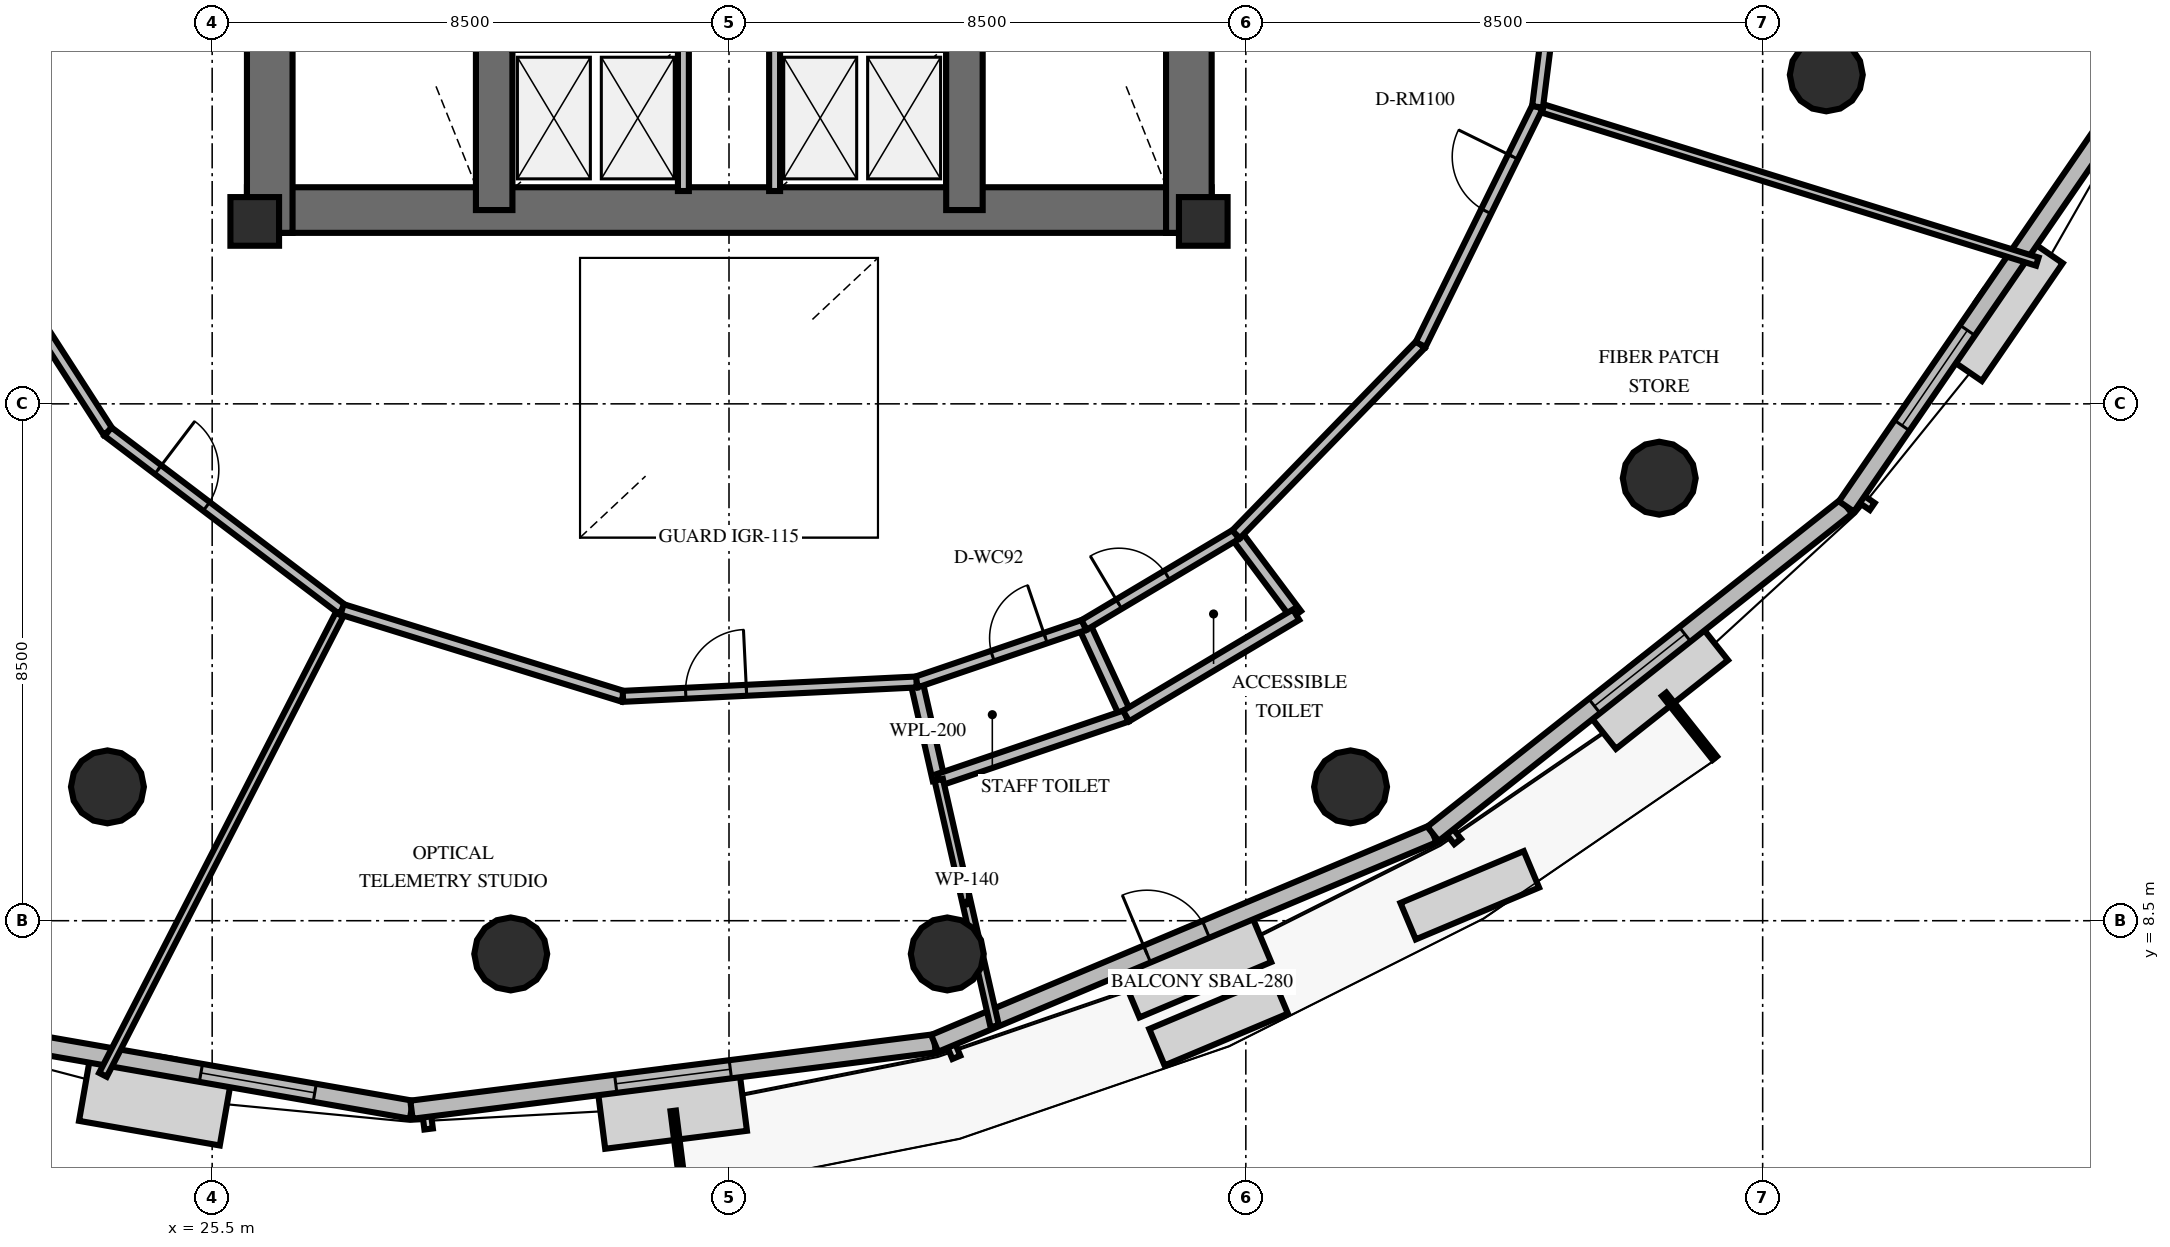
"""IFC4 building model, lengths in metres.
Left out: names, types, materials, properties, quantities, classifications, styles, units other than length and angle.
Written with IfcOpenShell. Run it as: python <this file> out.ifc"""

import sys

from ifc_helpers import new_model, si_unit, direction, frame, frame_2d, origin, origin_2d, place, context, subcontext, project, spatial, rectangle, circle, extrude, element, fill, save


model = new_model("IFC4")
c1 = context("Model", 3, precision=1e-05, world=origin(), true_north=direction((0.0, 1.0)))
c2 = subcontext(c1, "Body", "Model", "MODEL_VIEW")
j1 = project(units=[si_unit("LENGTHUNIT", "METRE"), si_unit("PLANEANGLEUNIT", "RADIAN")], contexts=[c1])
p1 = place(None, origin())
s1 = spatial("IfcSite", under=j1, at=p1, CompositionType="ELEMENT")
p2 = place(p1, origin())
s2 = spatial("IfcBuilding", under=s1, at=p2, CompositionType="ELEMENT")
p3 = place(p2, frame((0.0, 0.0, 129.8)))
s3 = spatial("IfcBuildingStorey", under=s2, at=p3, CompositionType="ELEMENT", Elevation=129.8)
p4 = place(p3, frame((26.072, 20.187, 0.0), z_axis=(0.0, 0.0, 1.0), x_axis=(1.0, 0.0, 0.0)))
e1 = element("IfcWall", 1, at=p4, inside=s3, PredefinedType="SHEAR", context=c2, shape_type="SweptSolid", body=[
    extrude(rectangle(XDim=15.866, YDim=0.75, at=frame_2d((7.933, 0.0))), origin(), (0.0, 0.0, 1.0), 4.0),
])
for number, where, z_axis, x_axis in (
    (2, (26.447, 19.812, 0.0), (0.0, 0.0, 1.0), (0.0, 1.0, 0.0)),
    (3, (41.563, 19.812, 0.0), (0.0, 0.0, 1.0), (0.0, 1.0, 0.0)),
):
    element("IfcWall", number, at=place(p3, frame(where, z_axis=z_axis, x_axis=x_axis)), inside=s3, PredefinedType="SHEAR", context=c2, shape_type="SweptSolid", body=[
        extrude(rectangle(XDim=10.576, YDim=0.75, at=frame_2d((5.288, 0.0))), origin(), (0.0, 0.0, 1.0), 4.0),
    ])
for number, where, z_axis, x_axis in (
    (4, (30.138, 20.187, 0.0), (0.0, 0.0, 1.0), (0.0, 1.0, 0.0)),
    (5, (37.872, 20.187, 0.0), (0.0, 0.0, 1.0), (0.0, 1.0, 0.0)),
):
    element("IfcWall", number, at=place(p3, frame(where, z_axis=z_axis, x_axis=x_axis)), inside=s3, PredefinedType="SHEAR", context=c2, shape_type="SweptSolid", body=[
        extrude(rectangle(XDim=9.826, YDim=0.6, at=frame_2d((4.913, 0.0))), origin(), (0.0, 0.0, 1.0), 4.0),
    ])
for number, where, z_axis, x_axis in (
    (6, (26.2, 20.0, 0.0), (0.0, 0.0, 1.0), (1.0, 0.0, 0.0)),
    (7, (41.8, 20.0, 0.0), (0.0, 0.0, 1.0), (1.0, 0.0, 0.0)),
):
    element("IfcColumn", number, at=place(p3, frame(where, z_axis=z_axis, x_axis=x_axis)), inside=s3, PredefinedType="PILASTER", context=c2, shape_type="SweptSolid", body=[
        extrude(rectangle(XDim=0.8, YDim=0.8, at=origin_2d()), origin(), (0.0, 0.0, 1.0), 4.0),
    ])
for number, where, z_axis, x_axis in (
    (8, (23.778, 10.701, 0.0), (0.0, 0.0, 1.0), (1.0, 0.0, 0.0)),
    (9, (30.41, 7.954, 0.0), (0.0, 0.0, 1.0), (1.0, 0.0, 0.0)),
    (10, (37.59, 7.954, 0.0), (0.0, 0.0, 1.0), (1.0, 0.0, 0.0)),
    (11, (44.222, 10.701, 0.0), (0.0, 0.0, 1.0), (1.0, 0.0, 0.0)),
    (12, (49.299, 15.778, 0.0), (0.0, 0.0, 1.0), (1.0, 0.0, 0.0)),
    (13, (52.046, 22.41, 0.0), (0.0, 0.0, 1.0), (1.0, 0.0, 0.0)),
):
    element("IfcColumn", number, at=place(p3, frame(where, z_axis=z_axis, x_axis=x_axis)), inside=s3, PredefinedType="COLUMN", context=c2, shape_type="SweptSolid", body=[
        extrude(circle(Radius=0.6, at=origin_2d()), origin(), (0.0, 0.0, 1.0), 4.0),
    ])
p5 = place(p3, frame((20.804, 6.786, 0.0), z_axis=(0.0, 0.0, 1.0), x_axis=(0.985055293806, -0.172238404964, 0.0)))
e14 = element("IfcWall", 14, at=p5, inside=s3, PredefinedType="SOLIDWALL", context=c2, shape_type="SweptSolid", body=[
    extrude(rectangle(XDim=8.095, YDim=0.3, at=frame_2d((4.048, 0.0))), origin(), (0.0, 0.0, 1.0), 2.9),
])
p6 = place(p5, frame((4.58, 0.0, 0.8)))
e15 = element("IfcOpeningElement", 15, at=p6, cuts=e14, PredefinedType="OPENING", context=c2, shape_type="SweptSolid", body=[
    extrude(rectangle(XDim=1.9, YDim=1.95, at=frame_2d((0.95, 0.975))), frame((0.0, 0.16, 0.0), z_axis=(0.0, -1.0, 0.0), x_axis=(1.0, 0.0, 0.0)), (0.0, 0.0, 1.0), 0.32),
])
p7 = place(p3, frame((28.778, 5.392, 0.0), z_axis=(0.0, 0.0, 1.0), x_axis=(0.992051922293, 0.12582918372, 0.0)))
e16 = element("IfcWall", 16, at=p7, inside=s3, PredefinedType="SOLIDWALL", context=c2, shape_type="SweptSolid", body=[
    extrude(rectangle(XDim=8.673, YDim=0.3, at=frame_2d((4.336, 0.0))), origin(), (0.0, 0.0, 1.0), 2.9),
])
p8 = place(p7, frame((3.386, 0.0, 0.8)))
e17 = element("IfcOpeningElement", 17, at=p8, cuts=e16, PredefinedType="OPENING", context=c2, shape_type="SweptSolid", body=[
    extrude(rectangle(XDim=1.9, YDim=1.95, at=frame_2d((0.95, 0.975))), frame((0.0, 0.16, 0.0), z_axis=(0.0, -1.0, 0.0), x_axis=(1.0, 0.0, 0.0)), (0.0, 0.0, 1.0), 0.32),
])
p9 = place(p3, frame((37.382, 6.483, 0.0), z_axis=(0.0, 0.0, 1.0), x_axis=(0.921862650999, 0.387516777305, 0.0)))
e18 = element("IfcWall", 18, at=p9, inside=s3, PredefinedType="SOLIDWALL", context=c2, shape_type="SweptSolid", body=[
    extrude(rectangle(XDim=8.891, YDim=0.3, at=frame_2d((4.445, 0.0))), origin(), (0.0, 0.0, 1.0), 2.9),
])
p10 = place(p9, frame((3.79, 0.0, 0.0)))
e19 = element("IfcOpeningElement", 19, at=p10, cuts=e18, PredefinedType="OPENING", context=c2, shape_type="SweptSolid", body=[
    extrude(rectangle(XDim=1.05, YDim=2.15, at=frame_2d((0.525, 1.075))), frame((0.0, 0.16, 0.0), z_axis=(0.0, -1.0, 0.0), x_axis=(1.0, 0.0, 0.0)), (0.0, 0.0, 1.0), 0.32),
])
p11 = place(p3, frame((45.578, 9.929, 0.0), z_axis=(0.0, 0.0, 1.0), x_axis=(0.784011575573, 0.620746203667, 0.0)))
e20 = element("IfcWall", 20, at=p11, inside=s3, PredefinedType="SOLIDWALL", context=c2, shape_type="SweptSolid", body=[
    extrude(rectangle(XDim=8.673, YDim=0.3, at=frame_2d((4.336, 0.0))), origin(), (0.0, 0.0, 1.0), 2.9),
])
p12 = place(p11, frame((3.386, 0.0, 0.8)))
e21 = element("IfcOpeningElement", 21, at=p12, cuts=e20, PredefinedType="OPENING", context=c2, shape_type="SweptSolid", body=[
    extrude(rectangle(XDim=1.9, YDim=1.95, at=frame_2d((0.95, 0.975))), frame((0.0, 0.16, 0.0), z_axis=(0.0, -1.0, 0.0), x_axis=(1.0, 0.0, 0.0)), (0.0, 0.0, 1.0), 0.32),
])
p13 = place(p3, frame((52.378, 15.312, 0.0), z_axis=(0.0, 0.0, 1.0), x_axis=(0.566158848857, 0.824296159072, 0.0)))
e22 = element("IfcWall", 22, at=p13, inside=s3, PredefinedType="SOLIDWALL", context=c2, shape_type="SweptSolid", body=[
    extrude(rectangle(XDim=8.095, YDim=0.3, at=frame_2d((4.047, 0.0))), origin(), (0.0, 0.0, 1.0), 2.9),
])
p14 = place(p13, frame((1.615, 0.0, 0.8)))
e23 = element("IfcOpeningElement", 23, at=p14, cuts=e22, PredefinedType="OPENING", context=c2, shape_type="SweptSolid", body=[
    extrude(rectangle(XDim=1.9, YDim=1.95, at=frame_2d((0.95, 0.975))), frame((0.0, 0.16, 0.0), z_axis=(0.0, -1.0, 0.0), x_axis=(1.0, 0.0, 0.0)), (0.0, 0.0, 1.0), 0.32),
])
for number, where, z_axis, x_axis in (
    (24, (33.25, 20.5, 0.0), (0.0, 0.0, 1.0), (0.0, 1.0, 0.0)),
    (25, (34.75, 20.5, 0.0), (0.0, 0.0, 1.0), (0.0, 1.0, 0.0)),
):
    element("IfcWall", number, at=place(p3, frame(where, z_axis=z_axis, x_axis=x_axis)), inside=s3, PredefinedType="SOLIDWALL", context=c2, shape_type="SweptSolid", body=[
        extrude(rectangle(XDim=2.42, YDim=0.18, at=frame_2d((1.21, 0.0))), origin(), (0.0, 0.0, 1.0), 2.8),
    ])
for number, where, z_axis, x_axis in (
    (26, (37.084, 12.426, 0.0), (0.0, 0.0, 1.0), (0.222, -0.975, 0.0)),
    (27, (39.839, 13.364, 0.0), (0.0, 0.0, 1.0), (0.419, -0.908, 0.0)),
):
    element("IfcWall", number, at=place(p3, frame(where, z_axis=z_axis, x_axis=x_axis)), inside=s3, PredefinedType="PLUMBINGWALL", context=c2, shape_type="SweptSolid", body=[
        extrude(rectangle(XDim=1.65, YDim=0.2, at=frame_2d((0.825, 0.0))), origin(), (0.0, 0.0, 1.0), 2.8),
    ])
p15 = place(p3, frame((37.449, 10.817, 0.0), z_axis=(0.0, 0.0, 1.0), x_axis=(0.946646498302, 0.322273807891, 0.0)))
e28 = element("IfcWall", 28, at=p15, inside=s3, PredefinedType="PLUMBINGWALL", context=c2, shape_type="SweptSolid", body=[
    extrude(rectangle(XDim=3.255, YDim=0.2, at=frame_2d((1.627, 0.0))), origin(), (0.0, 0.0, 1.0), 2.8),
])
p16 = place(p3, frame((37.084, 12.426, 0.0), z_axis=(0.0, 0.0, 1.0), x_axis=(0.946633568931, 0.322311784104, 0.0)))
e29 = element("IfcWall", 29, at=p16, inside=s3, PredefinedType="PARTITIONING", context=c2, shape_type="SweptSolid", body=[
    extrude(rectangle(XDim=2.91, YDim=0.18, at=frame_2d((1.455, 0.0))), origin(), (0.0, 0.0, 1.0), 2.8),
])
p17 = place(p16, frame((1.321, 0.0, 0.0)))
e30 = element("IfcOpeningElement", 30, at=p17, cuts=e29, PredefinedType="OPENING", context=c2, shape_type="SweptSolid", body=[
    extrude(rectangle(XDim=0.92, YDim=2.1, at=frame_2d((0.46, 1.05))), frame((0.0, 0.1, 0.0), z_axis=(0.0, -1.0, 0.0), x_axis=(1.0, 0.0, 0.0)), (0.0, 0.0, 1.0), 0.2),
])
p18 = place(p3, frame((42.338, 14.854, 0.0), z_axis=(0.0, 0.0, 1.0), x_axis=(0.599123667948, -0.800656499695, 0.0)))
e31 = element("IfcWall", 31, at=p18, inside=s3, PredefinedType="PLUMBINGWALL", context=c2, shape_type="SweptSolid", body=[
    extrude(rectangle(XDim=1.65, YDim=0.2, at=frame_2d((0.825, 0.0))), origin(), (0.0, 0.0, 1.0), 2.8),
])
p19 = place(p3, frame((40.531, 11.866, 0.0), z_axis=(0.0, 0.0, 1.0), x_axis=(0.858952049508, 0.512056028815, 0.0)))
e32 = element("IfcWall", 32, at=p19, inside=s3, PredefinedType="PLUMBINGWALL", context=c2, shape_type="SweptSolid", body=[
    extrude(rectangle(XDim=3.255, YDim=0.2, at=frame_2d((1.627, 0.0))), origin(), (0.0, 0.0, 1.0), 2.8),
])
p20 = place(p3, frame((39.839, 13.364, 0.0), z_axis=(0.0, 0.0, 1.0), x_axis=(0.858962586204, 0.512038353546, 0.0)))
e33 = element("IfcWall", 33, at=p20, inside=s3, PredefinedType="PARTITIONING", context=c2, shape_type="SweptSolid", body=[
    extrude(rectangle(XDim=2.91, YDim=0.18, at=frame_2d((1.455, 0.0))), origin(), (0.0, 0.0, 1.0), 2.8),
])
p21 = place(p20, frame((0.669, 0.0, 0.0)))
e34 = element("IfcOpeningElement", 34, at=p21, cuts=e33, PredefinedType="OPENING", context=c2, shape_type="SweptSolid", body=[
    extrude(rectangle(XDim=0.92, YDim=2.1, at=frame_2d((0.46, 1.05))), frame((0.0, 0.1, 0.0), z_axis=(0.0, -1.0, 0.0), x_axis=(1.0, 0.0, 0.0)), (0.0, 0.0, 1.0), 0.2),
])
p22 = place(p3, frame((37.449, 10.817, 0.0), z_axis=(0.0, 0.0, 1.0), x_axis=(0.221539804698, -0.975151329248, 0.0)))
e35 = element("IfcWall", 35, at=p22, inside=s3, PredefinedType="PARTITIONING", context=c2, shape_type="SweptSolid", body=[
    extrude(rectangle(XDim=4.154, YDim=0.14, at=frame_2d((2.077, 0.0))), origin(), (0.0, 0.0, 1.0), 2.8),
])
p23 = place(p3, frame((47.298, 21.884, 0.0), z_axis=(0.0, 0.0, 1.0), x_axis=(0.955272723626, -0.295726264467, 0.0)))
e36 = element("IfcWall", 36, at=p23, inside=s3, PredefinedType="PARTITIONING", context=c2, shape_type="SweptSolid", body=[
    extrude(rectangle(XDim=8.605, YDim=0.14, at=frame_2d((4.302, 0.0))), origin(), (0.0, 0.0, 1.0), 2.8),
])
p24 = place(p3, frame((42.338, 14.854, 0.0), z_axis=(0.0, 0.0, 1.0), x_axis=(0.697172044259, 0.716903857364, 0.0)))
e37 = element("IfcWall", 37, at=p24, inside=s3, PredefinedType="PARTITIONING", context=c2, shape_type="SweptSolid", body=[
    extrude(rectangle(XDim=4.355, YDim=0.18, at=frame_2d((2.178, 0.0))), origin(), (0.0, 0.0, 1.0), 2.8),
])
p25 = place(p3, frame((45.375, 17.976, 0.0), z_axis=(0.0, 0.0, 1.0), x_axis=(0.441509083926, 0.897256779752, 0.0)))
e38 = element("IfcWall", 38, at=p25, inside=s3, PredefinedType="PARTITIONING", context=c2, shape_type="SweptSolid", body=[
    extrude(rectangle(XDim=4.355, YDim=0.18, at=frame_2d((2.178, 0.0))), origin(), (0.0, 0.0, 1.0), 2.8),
])
p26 = place(p25, frame((2.441, 0.0, 0.0)))
e39 = element("IfcOpeningElement", 39, at=p26, cuts=e38, PredefinedType="OPENING", context=c2, shape_type="SweptSolid", body=[
    extrude(rectangle(XDim=1.0, YDim=2.15, at=frame_2d((0.5, 1.075))), frame((0.0, 0.1, 0.0), z_axis=(0.0, -1.0, 0.0), x_axis=(1.0, 0.0, 0.0)), (0.0, 0.0, 1.0), 0.2),
])
p27 = place(p3, frame((47.298, 21.884, 0.0), z_axis=(0.0, 0.0, 1.0), x_axis=(0.125296416972, 0.992119351638, 0.0)))
e40 = element("IfcWall", 40, at=p27, inside=s3, PredefinedType="PARTITIONING", context=c2, shape_type="SweptSolid", body=[
    extrude(rectangle(XDim=4.834, YDim=0.18, at=frame_2d((2.417, 0.0))), origin(), (0.0, 0.0, 1.0), 2.8),
])
p28 = place(p27, frame((2.688, 0.0, 0.0)))
e41 = element("IfcOpeningElement", 41, at=p28, cuts=e40, PredefinedType="OPENING", context=c2, shape_type="SweptSolid", body=[
    extrude(rectangle(XDim=1.15, YDim=2.15, at=frame_2d((0.575, 1.075))), frame((0.0, 0.1, 0.0), z_axis=(0.0, -1.0, 0.0), x_axis=(1.0, 0.0, 0.0)), (0.0, 0.0, 1.0), 0.2),
])
p29 = place(p3, frame((27.637, 13.619, 0.0), z_axis=(0.0, 0.0, 1.0), x_axis=(-0.457105027407, -0.889412724172, 0.0)))
e42 = element("IfcWall", 42, at=p29, inside=s3, PredefinedType="PARTITIONING", context=c2, shape_type="SweptSolid", body=[
    extrude(rectangle(XDim=8.605, YDim=0.14, at=frame_2d((4.302, 0.0))), origin(), (0.0, 0.0, 1.0), 2.8),
])
p30 = place(p3, frame((21.168, 20.606, 0.0), z_axis=(0.0, 0.0, 1.0), x_axis=(0.541732258193, -0.840551105188, 0.0)))
e43 = element("IfcWall", 43, at=p30, inside=s3, PredefinedType="PARTITIONING", context=c2, shape_type="SweptSolid", body=[
    extrude(rectangle(XDim=4.834, YDim=0.18, at=frame_2d((2.417, 0.0))), origin(), (0.0, 0.0, 1.0), 2.8),
])
p31 = place(p3, frame((23.787, 16.542, 0.0), z_axis=(0.0, 0.0, 1.0), x_axis=(0.796520179577, -0.604611944579, 0.0)))
e44 = element("IfcWall", 44, at=p31, inside=s3, PredefinedType="PARTITIONING", context=c2, shape_type="SweptSolid", body=[
    extrude(rectangle(XDim=4.834, YDim=0.18, at=frame_2d((2.417, 0.0))), origin(), (0.0, 0.0, 1.0), 2.8),
])
p32 = place(p31, frame((1.034, 0.0, 0.0)))
e45 = element("IfcOpeningElement", 45, at=p32, cuts=e44, PredefinedType="OPENING", context=c2, shape_type="SweptSolid", body=[
    extrude(rectangle(XDim=1.0, YDim=2.15, at=frame_2d((0.5, 1.075))), frame((0.0, 0.1, 0.0), z_axis=(0.0, -1.0, 0.0), x_axis=(1.0, 0.0, 0.0)), (0.0, 0.0, 1.0), 0.2),
])
p33 = place(p3, frame((27.637, 13.619, 0.0), z_axis=(0.0, 0.0, 1.0), x_axis=(0.955270945658, -0.295732007706, 0.0)))
e46 = element("IfcWall", 46, at=p33, inside=s3, PredefinedType="PARTITIONING", context=c2, shape_type="SweptSolid", body=[
    extrude(rectangle(XDim=4.834, YDim=0.18, at=frame_2d((2.417, 0.0))), origin(), (0.0, 0.0, 1.0), 2.8),
])
p34 = place(p3, frame((32.255, 12.19, 0.0), z_axis=(0.0, 0.0, 1.0), x_axis=(0.998806890168, 0.048834374699, 0.0)))
e47 = element("IfcWall", 47, at=p34, inside=s3, PredefinedType="PARTITIONING", context=c2, shape_type="SweptSolid", body=[
    extrude(rectangle(XDim=4.834, YDim=0.18, at=frame_2d((2.417, 0.0))), origin(), (0.0, 0.0, 1.0), 2.8),
])
p35 = place(p34, frame((1.034, 0.0, 0.0)))
e48 = element("IfcOpeningElement", 48, at=p35, cuts=e47, PredefinedType="OPENING", context=c2, shape_type="SweptSolid", body=[
    extrude(rectangle(XDim=1.0, YDim=2.15, at=frame_2d((0.5, 1.075))), frame((0.0, 0.1, 0.0), z_axis=(0.0, -1.0, 0.0), x_axis=(1.0, 0.0, 0.0)), (0.0, 0.0, 1.0), 0.2),
])
p36 = place(p6, origin())
e49 = element("IfcWindow", 49, at=p36, inside=s3, PartitioningType="SINGLE_PANEL", PredefinedType="WINDOW", context=c2, shape_type="SweptSolid", body=[
    extrude(rectangle(XDim=1.9, YDim=1.95, at=frame_2d((0.95, 0.975))), frame((0.0, 0.03, 0.0), z_axis=(0.0, -1.0, 0.0), x_axis=(1.0, 0.0, 0.0)), (0.0, 0.0, 1.0), 0.06),
])
fill(e15, e49)
p37 = place(p8, origin())
e50 = element("IfcWindow", 50, at=p37, inside=s3, PartitioningType="SINGLE_PANEL", PredefinedType="WINDOW", context=c2, shape_type="SweptSolid", body=[
    extrude(rectangle(XDim=1.9, YDim=1.95, at=frame_2d((0.95, 0.975))), frame((0.0, 0.03, 0.0), z_axis=(0.0, -1.0, 0.0), x_axis=(1.0, 0.0, 0.0)), (0.0, 0.0, 1.0), 0.06),
])
fill(e17, e50)
p38 = place(p10, origin())
e51 = element("IfcDoor", 51, at=p38, inside=s3, OperationType="SINGLE_SWING_LEFT", PredefinedType="DOOR", context=c2, shape_type="SweptSolid", body=[
    extrude(rectangle(XDim=1.05, YDim=2.15, at=frame_2d((0.525, 1.075))), frame((0.0, 0.025, 0.0), z_axis=(0.0, -1.0, 0.0), x_axis=(1.0, 0.0, 0.0)), (0.0, 0.0, 1.0), 0.05),
])
fill(e19, e51)
p39 = place(p12, origin())
e52 = element("IfcWindow", 52, at=p39, inside=s3, PartitioningType="SINGLE_PANEL", PredefinedType="WINDOW", context=c2, shape_type="SweptSolid", body=[
    extrude(rectangle(XDim=1.9, YDim=1.95, at=frame_2d((0.95, 0.975))), frame((0.0, 0.03, 0.0), z_axis=(0.0, -1.0, 0.0), x_axis=(1.0, 0.0, 0.0)), (0.0, 0.0, 1.0), 0.06),
])
fill(e21, e52)
p40 = place(p14, origin())
e53 = element("IfcWindow", 53, at=p40, inside=s3, PartitioningType="SINGLE_PANEL", PredefinedType="WINDOW", context=c2, shape_type="SweptSolid", body=[
    extrude(rectangle(XDim=1.9, YDim=1.95, at=frame_2d((0.95, 0.975))), frame((0.0, 0.03, 0.0), z_axis=(0.0, -1.0, 0.0), x_axis=(1.0, 0.0, 0.0)), (0.0, 0.0, 1.0), 0.06),
])
fill(e23, e53)
p41 = place(p17, origin())
e54 = element("IfcDoor", 54, at=p41, inside=s3, OperationType="SINGLE_SWING_RIGHT", PredefinedType="DOOR", context=c2, shape_type="SweptSolid", body=[
    extrude(rectangle(XDim=0.92, YDim=2.1, at=frame_2d((0.46, 1.05))), frame((0.0, 0.025, 0.0), z_axis=(0.0, -1.0, 0.0), x_axis=(1.0, 0.0, 0.0)), (0.0, 0.0, 1.0), 0.05),
])
fill(e30, e54)
p42 = place(p21, origin())
e55 = element("IfcDoor", 55, at=p42, inside=s3, OperationType="SINGLE_SWING_LEFT", PredefinedType="DOOR", context=c2, shape_type="SweptSolid", body=[
    extrude(rectangle(XDim=0.92, YDim=2.1, at=frame_2d((0.46, 1.05))), frame((0.0, 0.025, 0.0), z_axis=(0.0, -1.0, 0.0), x_axis=(1.0, 0.0, 0.0)), (0.0, 0.0, 1.0), 0.05),
])
fill(e34, e55)
p43 = place(p26, origin())
e56 = element("IfcDoor", 56, at=p43, inside=s3, OperationType="SINGLE_SWING_RIGHT", PredefinedType="DOOR", context=c2, shape_type="SweptSolid", body=[
    extrude(rectangle(XDim=1.0, YDim=2.15, at=frame_2d((0.5, 1.075))), frame((0.0, 0.025, 0.0), z_axis=(0.0, -1.0, 0.0), x_axis=(1.0, 0.0, 0.0)), (0.0, 0.0, 1.0), 0.05),
])
fill(e39, e56)
p44 = place(p32, origin())
e57 = element("IfcDoor", 57, at=p44, inside=s3, OperationType="SINGLE_SWING_LEFT", PredefinedType="DOOR", context=c2, shape_type="SweptSolid", body=[
    extrude(rectangle(XDim=1.0, YDim=2.15, at=frame_2d((0.5, 1.075))), frame((0.0, 0.025, 0.0), z_axis=(0.0, -1.0, 0.0), x_axis=(1.0, 0.0, 0.0)), (0.0, 0.0, 1.0), 0.05),
])
fill(e45, e57)
p45 = place(p35, origin())
e58 = element("IfcDoor", 58, at=p45, inside=s3, OperationType="SINGLE_SWING_RIGHT", PredefinedType="DOOR", context=c2, shape_type="SweptSolid", body=[
    extrude(rectangle(XDim=1.0, YDim=2.15, at=frame_2d((0.5, 1.075))), frame((0.0, 0.025, 0.0), z_axis=(0.0, -1.0, 0.0), x_axis=(1.0, 0.0, 0.0)), (0.0, 0.0, 1.0), 0.05),
])
fill(e48, e58)
save(model, sys.argv[1])
